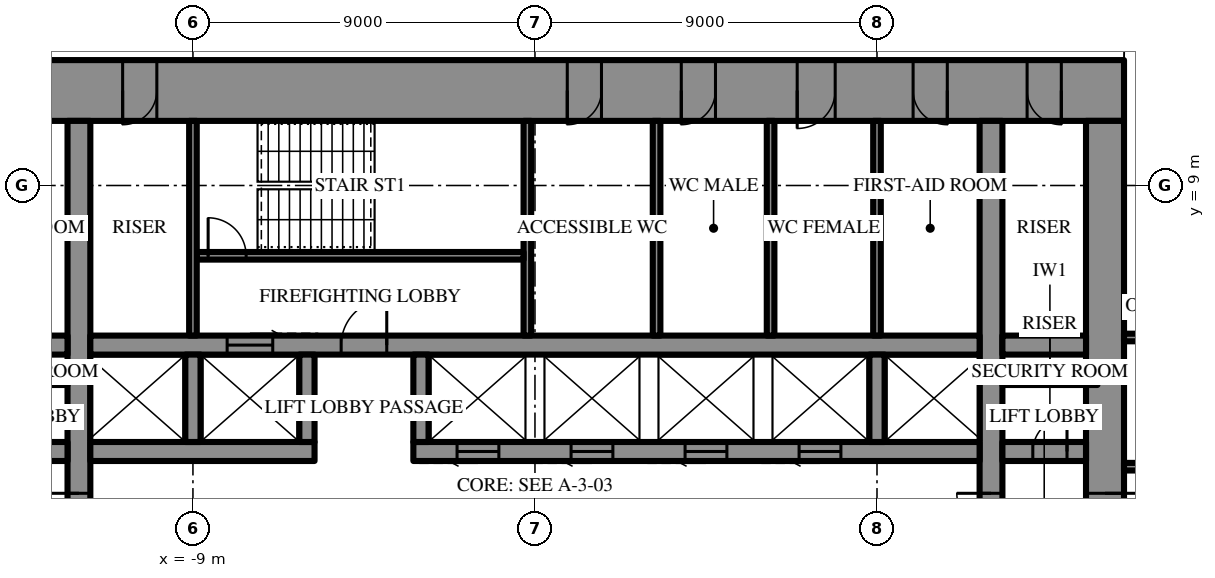
"""IFC4 building model, lengths in metres.
Left out: names, types, materials, properties, quantities, classifications, styles, units other than length and angle.
Written with IfcOpenShell. Run it as: python <this file> out.ifc"""

import sys

from ifc_helpers import new_model, si_unit, direction, frame, frame_2d, origin, place, context, subcontext, project, spatial, rectangle, extrude, element, fill, save


model = new_model("IFC4")
c1 = context("Model", 3, precision=1e-05, world=origin(), true_north=direction((0.0, 1.0)))
c2 = subcontext(c1, "Body", "Model", "MODEL_VIEW")
j1 = project(units=[si_unit("LENGTHUNIT", "METRE"), si_unit("PLANEANGLEUNIT", "RADIAN")], contexts=[c1])
p1 = place(None, origin())
s1 = spatial("IfcSite", under=j1, at=p1, CompositionType="ELEMENT")
p2 = place(p1, origin())
s2 = spatial("IfcBuilding", under=s1, at=p2, CompositionType="ELEMENT")
p3 = place(p2, frame((0.0, 0.0, 253.3)))
s3 = spatial("IfcBuildingStorey", under=s2, at=p3, CompositionType="ELEMENT", Elevation=253.3)
p4 = place(p3, frame((-15.5, 11.5, 0.0), z_axis=(0.0, 0.0, 1.0), x_axis=(1.0, 0.0, 0.0)))
e1 = element("IfcWall", 1, at=p4, inside=s3, PredefinedType="SHEAR", context=c2, shape_type="SweptSolid", body=[
    extrude(rectangle(XDim=31.0, YDim=1.6, at=frame_2d((15.5, 0.0))), origin(), (0.0, 0.0, 1.0), 4.2),
])
p5 = place(p4, frame((16.35, 0.0, 0.0)))
e2 = element("IfcOpeningElement", 2, at=p5, cuts=e1, PredefinedType="OPENING", context=c2, shape_type="SweptSolid", body=[
    extrude(rectangle(XDim=0.9, YDim=2.2, at=frame_2d((0.45, 1.1))), frame((0.0, 0.81, 0.0), z_axis=(0.0, -1.0, 0.0), x_axis=(1.0, 0.0, 0.0)), (0.0, 0.0, 1.0), 1.62),
])
p6 = place(p4, frame((19.35, 0.0, 0.0)))
e3 = element("IfcOpeningElement", 3, at=p6, cuts=e1, PredefinedType="OPENING", context=c2, shape_type="SweptSolid", body=[
    extrude(rectangle(XDim=0.9, YDim=2.2, at=frame_2d((0.45, 1.1))), frame((0.0, 0.81, 0.0), z_axis=(0.0, -1.0, 0.0), x_axis=(1.0, 0.0, 0.0)), (0.0, 0.0, 1.0), 1.62),
])
p7 = place(p4, frame((22.4, 0.0, 0.0)))
e4 = element("IfcOpeningElement", 4, at=p7, cuts=e1, PredefinedType="OPENING", context=c2, shape_type="SweptSolid", body=[
    extrude(rectangle(XDim=1.0, YDim=2.2, at=frame_2d((0.5, 1.1))), frame((0.0, 0.81, 0.0), z_axis=(0.0, -1.0, 0.0), x_axis=(1.0, 0.0, 0.0)), (0.0, 0.0, 1.0), 1.62),
])
p8 = place(p4, frame((1.65, 0.0, 0.0)))
e5 = element("IfcOpeningElement", 5, at=p8, cuts=e1, PredefinedType="OPENING", context=c2, shape_type="SweptSolid", body=[
    extrude(rectangle(XDim=0.9, YDim=2.2, at=frame_2d((0.45, 1.1))), frame((0.0, 0.81, 0.0), z_axis=(0.0, -1.0, 0.0), x_axis=(1.0, 0.0, 0.0)), (0.0, 0.0, 1.0), 1.62),
])
p9 = place(p4, frame((4.65, 0.0, 0.0)))
e6 = element("IfcOpeningElement", 6, at=p9, cuts=e1, PredefinedType="OPENING", context=c2, shape_type="SweptSolid", body=[
    extrude(rectangle(XDim=0.9, YDim=2.2, at=frame_2d((0.45, 1.1))), frame((0.0, 0.81, 0.0), z_axis=(0.0, -1.0, 0.0), x_axis=(1.0, 0.0, 0.0)), (0.0, 0.0, 1.0), 1.62),
])
p10 = place(p4, frame((25.45, 0.0, 0.0)))
e7 = element("IfcOpeningElement", 7, at=p10, cuts=e1, PredefinedType="OPENING", context=c2, shape_type="SweptSolid", body=[
    extrude(rectangle(XDim=0.9, YDim=2.2, at=frame_2d((0.45, 1.1))), frame((0.0, 0.81, 0.0), z_axis=(0.0, -1.0, 0.0), x_axis=(1.0, 0.0, 0.0)), (0.0, 0.0, 1.0), 1.62),
])
p11 = place(p4, frame((28.45, 0.0, 0.0)))
e8 = element("IfcOpeningElement", 8, at=p11, cuts=e1, PredefinedType="OPENING", context=c2, shape_type="SweptSolid", body=[
    extrude(rectangle(XDim=0.9, YDim=2.2, at=frame_2d((0.45, 1.1))), frame((0.0, 0.81, 0.0), z_axis=(0.0, -1.0, 0.0), x_axis=(1.0, 0.0, 0.0)), (0.0, 0.0, 1.0), 1.62),
])
p12 = place(p3, frame((15.0, -10.7, 0.0), z_axis=(0.0, 0.0, 1.0), x_axis=(0.0, 1.0, 0.0)))
e9 = element("IfcWall", 9, at=p12, inside=s3, PredefinedType="SHEAR", context=c2, shape_type="SweptSolid", body=[
    extrude(rectangle(XDim=21.4, YDim=1.0, at=frame_2d((10.7, 0.0))), origin(), (0.0, 0.0, 1.0), 4.2),
])
p13 = place(p12, frame((9.8, 0.0, 0.0)))
e10 = element("IfcOpeningElement", 10, at=p13, cuts=e9, PredefinedType="OPENING", context=c2, shape_type="SweptSolid", body=[
    extrude(rectangle(XDim=1.8, YDim=2.4, at=frame_2d((0.9, 1.2))), frame((0.0, 0.51, 0.0), z_axis=(0.0, -1.0, 0.0), x_axis=(1.0, 0.0, 0.0)), (0.0, 0.0, 1.0), 1.02),
])
p14 = place(p3, frame((12.0, -10.7, 0.0), z_axis=(0.0, 0.0, 1.0), x_axis=(0.0, 1.0, 0.0)))
e11 = element("IfcWall", 11, at=p14, inside=s3, PredefinedType="SHEAR", context=c2, shape_type="SweptSolid", body=[
    extrude(rectangle(XDim=21.4, YDim=0.6, at=frame_2d((10.7, 0.0))), origin(), (0.0, 0.0, 1.0), 4.2),
])
p15 = place(p14, frame((9.8, 0.0, 0.0)))
e12 = element("IfcOpeningElement", 12, at=p15, cuts=e11, PredefinedType="OPENING", context=c2, shape_type="SweptSolid", body=[
    extrude(rectangle(XDim=1.8, YDim=2.4, at=frame_2d((0.9, 1.2))), frame((0.0, 0.31, 0.0), z_axis=(0.0, -1.0, 0.0), x_axis=(1.0, 0.0, 0.0)), (0.0, 0.0, 1.0), 0.62),
])
p16 = place(p3, frame((-12.0, -10.7, 0.0), z_axis=(0.0, 0.0, 1.0), x_axis=(0.0, 1.0, 0.0)))
e13 = element("IfcWall", 13, at=p16, inside=s3, PredefinedType="SHEAR", context=c2, shape_type="SweptSolid", body=[
    extrude(rectangle(XDim=21.4, YDim=0.6, at=frame_2d((10.7, 0.0))), origin(), (0.0, 0.0, 1.0), 4.2),
])
p17 = place(p16, frame((9.8, 0.0, 0.0)))
e14 = element("IfcOpeningElement", 14, at=p17, cuts=e13, PredefinedType="OPENING", context=c2, shape_type="SweptSolid", body=[
    extrude(rectangle(XDim=1.8, YDim=2.4, at=frame_2d((0.9, 1.2))), frame((0.0, 0.31, 0.0), z_axis=(0.0, -1.0, 0.0), x_axis=(1.0, 0.0, 0.0)), (0.0, 0.0, 1.0), 0.62),
])
p18 = place(p3, frame((-14.5, 2.0, 0.0), z_axis=(0.0, 0.0, 1.0), x_axis=(1.0, 0.0, 0.0)))
e15 = element("IfcWall", 15, at=p18, inside=s3, PredefinedType="SHEAR", context=c2, shape_type="SweptSolid", body=[
    extrude(rectangle(XDim=2.2, YDim=0.5, at=frame_2d((1.1, 0.0))), origin(), (0.0, 0.0, 1.0), 4.2),
])
p19 = place(p18, frame((0.5, 0.0, 0.0)))
e16 = element("IfcOpeningElement", 16, at=p19, cuts=e15, PredefinedType="OPENING", context=c2, shape_type="SweptSolid", body=[
    extrude(rectangle(XDim=0.9, YDim=2.2, at=frame_2d((0.45, 1.1))), frame((0.0, 0.26, 0.0), z_axis=(0.0, -1.0, 0.0), x_axis=(1.0, 0.0, 0.0)), (0.0, 0.0, 1.0), 0.52),
])
p20 = place(p3, frame((-11.7, 2.0, 0.0), z_axis=(0.0, 0.0, 1.0), x_axis=(1.0, 0.0, 0.0)))
e17 = element("IfcWall", 17, at=p20, inside=s3, PredefinedType="SHEAR", context=c2, shape_type="SweptSolid", body=[
    extrude(rectangle(XDim=5.9, YDim=0.5, at=frame_2d((2.95, 0.0))), origin(), (0.0, 0.0, 1.0), 4.2),
])
p21 = place(p3, frame((-3.2, 2.0, 0.0), z_axis=(0.0, 0.0, 1.0), x_axis=(1.0, 0.0, 0.0)))
e18 = element("IfcWall", 18, at=p21, inside=s3, PredefinedType="SHEAR", context=c2, shape_type="SweptSolid", body=[
    extrude(rectangle(XDim=14.9, YDim=0.5, at=frame_2d((7.45, 0.0))), origin(), (0.0, 0.0, 1.0), 4.2),
])
p22 = place(p21, frame((1.15, 0.0, 0.0)))
e19 = element("IfcOpeningElement", 19, at=p22, cuts=e18, PredefinedType="OPENING", context=c2, shape_type="SweptSolid", body=[
    extrude(rectangle(XDim=1.1, YDim=2.2, at=frame_2d((0.55, 1.1))), frame((0.0, 0.26, 0.0), z_axis=(0.0, -1.0, 0.0), x_axis=(1.0, 0.0, 0.0)), (0.0, 0.0, 1.0), 0.52),
])
p23 = place(p21, frame((4.15, 0.0, 0.0)))
e20 = element("IfcOpeningElement", 20, at=p23, cuts=e18, PredefinedType="OPENING", context=c2, shape_type="SweptSolid", body=[
    extrude(rectangle(XDim=1.1, YDim=2.2, at=frame_2d((0.55, 1.1))), frame((0.0, 0.26, 0.0), z_axis=(0.0, -1.0, 0.0), x_axis=(1.0, 0.0, 0.0)), (0.0, 0.0, 1.0), 0.52),
])
p24 = place(p21, frame((7.15, 0.0, 0.0)))
e21 = element("IfcOpeningElement", 21, at=p24, cuts=e18, PredefinedType="OPENING", context=c2, shape_type="SweptSolid", body=[
    extrude(rectangle(XDim=1.1, YDim=2.2, at=frame_2d((0.55, 1.1))), frame((0.0, 0.26, 0.0), z_axis=(0.0, -1.0, 0.0), x_axis=(1.0, 0.0, 0.0)), (0.0, 0.0, 1.0), 0.52),
])
p25 = place(p21, frame((10.15, 0.0, 0.0)))
e22 = element("IfcOpeningElement", 22, at=p25, cuts=e18, PredefinedType="OPENING", context=c2, shape_type="SweptSolid", body=[
    extrude(rectangle(XDim=1.1, YDim=2.2, at=frame_2d((0.55, 1.1))), frame((0.0, 0.26, 0.0), z_axis=(0.0, -1.0, 0.0), x_axis=(1.0, 0.0, 0.0)), (0.0, 0.0, 1.0), 0.52),
])
p26 = place(p3, frame((12.3, 2.0, 0.0), z_axis=(0.0, 0.0, 1.0), x_axis=(1.0, 0.0, 0.0)))
e23 = element("IfcWall", 23, at=p26, inside=s3, PredefinedType="SHEAR", context=c2, shape_type="SweptSolid", body=[
    extrude(rectangle(XDim=2.2, YDim=0.5, at=frame_2d((1.1, 0.0))), origin(), (0.0, 0.0, 1.0), 4.2),
])
p27 = place(p26, frame((0.8, 0.0, 0.0)))
e24 = element("IfcOpeningElement", 24, at=p27, cuts=e23, PredefinedType="OPENING", context=c2, shape_type="SweptSolid", body=[
    extrude(rectangle(XDim=0.9, YDim=2.2, at=frame_2d((0.45, 1.1))), frame((0.0, 0.26, 0.0), z_axis=(0.0, -1.0, 0.0), x_axis=(1.0, 0.0, 0.0)), (0.0, 0.0, 1.0), 0.52),
])
p28 = place(p3, frame((-14.5, 4.8, 0.0), z_axis=(0.0, 0.0, 1.0), x_axis=(1.0, 0.0, 0.0)))
e25 = element("IfcWall", 25, at=p28, inside=s3, PredefinedType="SHEAR", context=c2, shape_type="SweptSolid", body=[
    extrude(rectangle(XDim=2.2, YDim=0.5, at=frame_2d((1.1, 0.0))), origin(), (0.0, 0.0, 1.0), 4.2),
])
p29 = place(p3, frame((-11.7, 4.8, 0.0), z_axis=(0.0, 0.0, 1.0), x_axis=(1.0, 0.0, 0.0)))
e26 = element("IfcWall", 26, at=p29, inside=s3, PredefinedType="SHEAR", context=c2, shape_type="SweptSolid", body=[
    extrude(rectangle(XDim=23.4, YDim=0.5, at=frame_2d((11.7, 0.0))), origin(), (0.0, 0.0, 1.0), 4.2),
])
p30 = place(p29, frame((6.6, 0.0, 0.0)))
e27 = element("IfcOpeningElement", 27, at=p30, cuts=e26, PredefinedType="OPENING", context=c2, shape_type="SweptSolid", body=[
    extrude(rectangle(XDim=1.2, YDim=2.2, at=frame_2d((0.6, 1.1))), frame((0.0, 0.26, 0.0), z_axis=(0.0, -1.0, 0.0), x_axis=(1.0, 0.0, 0.0)), (0.0, 0.0, 1.0), 0.52),
])
p31 = place(p29, frame((3.6, 0.0, 0.0)))
e28 = element("IfcOpeningElement", 28, at=p31, cuts=e26, PredefinedType="OPENING", context=c2, shape_type="SweptSolid", body=[
    extrude(rectangle(XDim=1.2, YDim=2.2, at=frame_2d((0.6, 1.1))), frame((0.0, 0.26, 0.0), z_axis=(0.0, -1.0, 0.0), x_axis=(1.0, 0.0, 0.0)), (0.0, 0.0, 1.0), 0.52),
])
p32 = place(p3, frame((12.3, 4.8, 0.0), z_axis=(0.0, 0.0, 1.0), x_axis=(1.0, 0.0, 0.0)))
e29 = element("IfcWall", 29, at=p32, inside=s3, PredefinedType="SHEAR", context=c2, shape_type="SweptSolid", body=[
    extrude(rectangle(XDim=2.2, YDim=0.5, at=frame_2d((1.1, 0.0))), origin(), (0.0, 0.0, 1.0), 4.2),
])
for number, where, z_axis, x_axis in (
    (30, (-9.0, 2.25, 0.0), (0.0, 0.0, 1.0), (0.0, 1.0, 0.0)),
    (31, (-6.0, 2.25, 0.0), (0.0, 0.0, 1.0), (0.0, 1.0, 0.0)),
    (32, (-3.0, 2.25, 0.0), (0.0, 0.0, 1.0), (0.0, 1.0, 0.0)),
    (33, (9.0, 2.25, 0.0), (0.0, 0.0, 1.0), (0.0, 1.0, 0.0)),
):
    element("IfcWall", number, at=place(p3, frame(where, z_axis=z_axis, x_axis=x_axis)), inside=s3, PredefinedType="SHEAR", context=c2, shape_type="SweptSolid", body=[
        extrude(rectangle(XDim=2.3, YDim=0.4, at=frame_2d((1.15, 0.0))), origin(), (0.0, 0.0, 1.0), 4.2),
    ])
p33 = place(p3, frame((-0.2, 5.05, 0.0), z_axis=(0.0, 0.0, 1.0), x_axis=(0.0, 1.0, 0.0)))
e34 = element("IfcWall", 34, at=p33, inside=s3, PredefinedType="SHEAR", context=c2, shape_type="SweptSolid", body=[
    extrude(rectangle(XDim=5.65, YDim=0.2, at=frame_2d((2.825, 0.0))), origin(), (0.0, 0.0, 1.0), 4.2),
])
p34 = place(p3, frame((-8.9, 7.15, 0.0), z_axis=(0.0, 0.0, 1.0), x_axis=(1.0, 0.0, 0.0)))
e35 = element("IfcWall", 35, at=p34, inside=s3, PredefinedType="SHEAR", context=c2, shape_type="SweptSolid", body=[
    extrude(rectangle(XDim=8.6, YDim=0.2, at=frame_2d((4.3, 0.0))), origin(), (0.0, 0.0, 1.0), 4.2),
])
p35 = place(p34, frame((0.3, 0.0, 0.0)))
e36 = element("IfcOpeningElement", 36, at=p35, cuts=e35, PredefinedType="OPENING", context=c2, shape_type="SweptSolid", body=[
    extrude(rectangle(XDim=1.0, YDim=2.2, at=frame_2d((0.5, 1.1))), frame((0.0, 0.11, 0.0), z_axis=(0.0, -1.0, 0.0), x_axis=(1.0, 0.0, 0.0)), (0.0, 0.0, 1.0), 0.22),
])
for number, where, z_axis, x_axis in (
    (37, (-9.0, 5.05, 0.0), (0.0, 0.0, 1.0), (0.0, 1.0, 0.0)),
    (38, (9.0, 5.05, 0.0), (0.0, 0.0, 1.0), (0.0, 1.0, 0.0)),
    (39, (3.2, 5.05, 0.0), (0.0, 0.0, 1.0), (0.0, 1.0, 0.0)),
    (40, (6.2, 5.05, 0.0), (0.0, 0.0, 1.0), (0.0, 1.0, 0.0)),
):
    element("IfcWall", number, at=place(p3, frame(where, z_axis=z_axis, x_axis=x_axis)), inside=s3, PredefinedType="PARTITIONING", context=c2, shape_type="SweptSolid", body=[
        extrude(rectangle(XDim=5.65, YDim=0.2, at=frame_2d((2.825, 0.0))), origin(), (0.0, 0.0, 1.0), 4.0),
    ])
for number, where, z_axis, x_axis in (
    (41, (-14.8, 3.85, 0.0), (0.0, 0.0, 1.0), (1.0, 0.0, 0.0)),
    (42, (12.3, 3.85, 0.0), (0.0, 0.0, 1.0), (1.0, 0.0, 0.0)),
):
    element("IfcWall", number, at=place(p3, frame(where, z_axis=z_axis, x_axis=x_axis)), inside=s3, PredefinedType="PARTITIONING", context=c2, shape_type="SweptSolid", body=[
        extrude(rectangle(XDim=2.5, YDim=0.2, at=frame_2d((1.25, 0.0))), origin(), (0.0, 0.0, 1.0), 4.0),
    ])
p36 = place(p3, frame((15.5, 1.6, 0.0), z_axis=(0.0, 0.0, 1.0), x_axis=(1.0, 0.0, 0.0)))
e43 = element("IfcWall", 43, at=p36, inside=s3, PredefinedType="PARTITIONING", context=c2, shape_type="SweptSolid", body=[
    extrude(rectangle(XDim=2.3, YDim=0.2, at=frame_2d((1.15, 0.0))), origin(), (0.0, 0.0, 1.0), 4.0),
])
p37 = place(p3, frame((15.5, 5.0, 0.0), z_axis=(0.0, 0.0, 1.0), x_axis=(1.0, 0.0, 0.0)))
e44 = element("IfcWall", 44, at=p37, inside=s3, PredefinedType="PARTITIONING", context=c2, shape_type="SweptSolid", body=[
    extrude(rectangle(XDim=2.3, YDim=0.2, at=frame_2d((1.15, 0.0))), origin(), (0.0, 0.0, 1.0), 4.0),
])
p38 = place(p37, frame((0.65, 0.0, 0.0)))
e45 = element("IfcOpeningElement", 45, at=p38, cuts=e44, PredefinedType="OPENING", context=c2, shape_type="SweptSolid", body=[
    extrude(rectangle(XDim=1.0, YDim=2.2, at=frame_2d((0.5, 1.1))), frame((0.0, 0.11, 0.0), z_axis=(0.0, -1.0, 0.0), x_axis=(1.0, 0.0, 0.0)), (0.0, 0.0, 1.0), 0.22),
])
p39 = place(p13, frame((1.8, 0.0, 0.0), z_axis=(0.0, 0.0, 1.0), x_axis=(-1.0, 0.0, 0.0)))
e46 = element("IfcDoor", 46, at=p39, inside=s3, OperationType="DOUBLE_DOOR_SINGLE_SWING", PredefinedType="DOOR", context=c2, shape_type="SweptSolid", body=[
    extrude(rectangle(XDim=1.8, YDim=2.4, at=frame_2d((0.9, 1.2))), frame((0.0, 0.025, 0.0), z_axis=(0.0, -1.0, 0.0), x_axis=(1.0, 0.0, 0.0)), (0.0, 0.0, 1.0), 0.05),
])
fill(e10, e46)
p40 = place(p30, origin())
e47 = element("IfcDoor", 47, at=p40, inside=s3, OperationType="SINGLE_SWING_LEFT", PredefinedType="DOOR", context=c2, shape_type="SweptSolid", body=[
    extrude(rectangle(XDim=1.2, YDim=2.2, at=frame_2d((0.6, 1.1))), frame((0.0, 0.025, 0.0), z_axis=(0.0, -1.0, 0.0), x_axis=(1.0, 0.0, 0.0)), (0.0, 0.0, 1.0), 0.05),
])
fill(e27, e47)
p41 = place(p35, origin())
e48 = element("IfcDoor", 48, at=p41, inside=s3, OperationType="SINGLE_SWING_RIGHT", PredefinedType="DOOR", context=c2, shape_type="SweptSolid", body=[
    extrude(rectangle(XDim=1.0, YDim=2.2, at=frame_2d((0.5, 1.1))), frame((0.0, 0.025, 0.0), z_axis=(0.0, -1.0, 0.0), x_axis=(1.0, 0.0, 0.0)), (0.0, 0.0, 1.0), 0.05),
])
fill(e36, e48)
p42 = place(p5, frame((0.9, 0.0, 0.0), z_axis=(0.0, 0.0, 1.0), x_axis=(-1.0, 0.0, 0.0)))
e49 = element("IfcDoor", 49, at=p42, inside=s3, OperationType="SINGLE_SWING_LEFT", PredefinedType="DOOR", context=c2, shape_type="SweptSolid", body=[
    extrude(rectangle(XDim=0.9, YDim=2.2, at=frame_2d((0.45, 1.1))), frame((0.0, 0.025, 0.0), z_axis=(0.0, -1.0, 0.0), x_axis=(1.0, 0.0, 0.0)), (0.0, 0.0, 1.0), 0.05),
])
fill(e2, e49)
p43 = place(p6, frame((0.9, 0.0, 0.0), z_axis=(0.0, 0.0, 1.0), x_axis=(-1.0, 0.0, 0.0)))
e50 = element("IfcDoor", 50, at=p43, inside=s3, OperationType="SINGLE_SWING_LEFT", PredefinedType="DOOR", context=c2, shape_type="SweptSolid", body=[
    extrude(rectangle(XDim=0.9, YDim=2.2, at=frame_2d((0.45, 1.1))), frame((0.0, 0.025, 0.0), z_axis=(0.0, -1.0, 0.0), x_axis=(1.0, 0.0, 0.0)), (0.0, 0.0, 1.0), 0.05),
])
fill(e3, e50)
p44 = place(p7, frame((1.0, 0.0, 0.0), z_axis=(0.0, 0.0, 1.0), x_axis=(-1.0, 0.0, 0.0)))
e51 = element("IfcDoor", 51, at=p44, inside=s3, OperationType="SINGLE_SWING_LEFT", PredefinedType="DOOR", context=c2, shape_type="SweptSolid", body=[
    extrude(rectangle(XDim=1.0, YDim=2.2, at=frame_2d((0.5, 1.1))), frame((0.0, 0.025, 0.0), z_axis=(0.0, -1.0, 0.0), x_axis=(1.0, 0.0, 0.0)), (0.0, 0.0, 1.0), 0.05),
])
fill(e4, e51)
p45 = place(p9, frame((0.9, 0.0, 0.0), z_axis=(0.0, 0.0, 1.0), x_axis=(-1.0, 0.0, 0.0)))
e52 = element("IfcDoor", 52, at=p45, inside=s3, OperationType="SINGLE_SWING_LEFT", PredefinedType="DOOR", context=c2, shape_type="SweptSolid", body=[
    extrude(rectangle(XDim=0.9, YDim=2.2, at=frame_2d((0.45, 1.1))), frame((0.0, 0.025, 0.0), z_axis=(0.0, -1.0, 0.0), x_axis=(1.0, 0.0, 0.0)), (0.0, 0.0, 1.0), 0.05),
])
fill(e6, e52)
p46 = place(p10, frame((0.9, 0.0, 0.0), z_axis=(0.0, 0.0, 1.0), x_axis=(-1.0, 0.0, 0.0)))
e53 = element("IfcDoor", 53, at=p46, inside=s3, OperationType="SINGLE_SWING_RIGHT", PredefinedType="DOOR", context=c2, shape_type="SweptSolid", body=[
    extrude(rectangle(XDim=0.9, YDim=2.2, at=frame_2d((0.45, 1.1))), frame((0.0, 0.025, 0.0), z_axis=(0.0, -1.0, 0.0), x_axis=(1.0, 0.0, 0.0)), (0.0, 0.0, 1.0), 0.05),
])
fill(e7, e53)
p47 = place(p11, frame((0.9, 0.0, 0.0), z_axis=(0.0, 0.0, 1.0), x_axis=(-1.0, 0.0, 0.0)))
e54 = element("IfcDoor", 54, at=p47, inside=s3, OperationType="SINGLE_SWING_RIGHT", PredefinedType="DOOR", context=c2, shape_type="SweptSolid", body=[
    extrude(rectangle(XDim=0.9, YDim=2.2, at=frame_2d((0.45, 1.1))), frame((0.0, 0.025, 0.0), z_axis=(0.0, -1.0, 0.0), x_axis=(1.0, 0.0, 0.0)), (0.0, 0.0, 1.0), 0.05),
])
fill(e8, e54)
p48 = place(p27, origin())
e55 = element("IfcDoor", 55, at=p48, inside=s3, OperationType="SINGLE_SWING_LEFT", PredefinedType="DOOR", context=c2, shape_type="SweptSolid", body=[
    extrude(rectangle(XDim=0.9, YDim=2.2, at=frame_2d((0.45, 1.1))), frame((0.0, 0.025, 0.0), z_axis=(0.0, -1.0, 0.0), x_axis=(1.0, 0.0, 0.0)), (0.0, 0.0, 1.0), 0.05),
])
fill(e24, e55)
p49 = place(p15, origin())
e56 = element("IfcDoor", 56, at=p49, inside=s3, OperationType="DOUBLE_DOOR_SINGLE_SWING", PredefinedType="DOOR", context=c2, shape_type="SweptSolid", body=[
    extrude(rectangle(XDim=1.8, YDim=2.4, at=frame_2d((0.9, 1.2))), frame((0.0, 0.025, 0.0), z_axis=(0.0, -1.0, 0.0), x_axis=(1.0, 0.0, 0.0)), (0.0, 0.0, 1.0), 0.05),
])
fill(e12, e56)
p50 = place(p17, origin())
e57 = element("IfcDoor", 57, at=p50, inside=s3, OperationType="DOUBLE_DOOR_SINGLE_SWING", PredefinedType="DOOR", context=c2, shape_type="SweptSolid", body=[
    extrude(rectangle(XDim=1.8, YDim=2.4, at=frame_2d((0.9, 1.2))), frame((0.0, 0.025, 0.0), z_axis=(0.0, -1.0, 0.0), x_axis=(1.0, 0.0, 0.0)), (0.0, 0.0, 1.0), 0.05),
])
fill(e14, e57)
p51 = place(p31, origin())
e58 = element("IfcDoor", 58, at=p51, inside=s3, OperationType="SLIDING_TO_LEFT", PredefinedType="DOOR", context=c2, shape_type="SweptSolid", body=[
    extrude(rectangle(XDim=1.2, YDim=2.2, at=frame_2d((0.6, 1.1))), frame((0.0, 0.025, 0.0), z_axis=(0.0, -1.0, 0.0), x_axis=(1.0, 0.0, 0.0)), (0.0, 0.0, 1.0), 0.05),
])
fill(e28, e58)
p52 = place(p22, frame((1.1, 0.0, 0.0), z_axis=(0.0, 0.0, 1.0), x_axis=(-1.0, 0.0, 0.0)))
e59 = element("IfcDoor", 59, at=p52, inside=s3, OperationType="SLIDING_TO_LEFT", PredefinedType="DOOR", context=c2, shape_type="SweptSolid", body=[
    extrude(rectangle(XDim=1.1, YDim=2.2, at=frame_2d((0.55, 1.1))), frame((0.0, 0.025, 0.0), z_axis=(0.0, -1.0, 0.0), x_axis=(1.0, 0.0, 0.0)), (0.0, 0.0, 1.0), 0.05),
])
fill(e19, e59)
p53 = place(p23, frame((1.1, 0.0, 0.0), z_axis=(0.0, 0.0, 1.0), x_axis=(-1.0, 0.0, 0.0)))
e60 = element("IfcDoor", 60, at=p53, inside=s3, OperationType="SLIDING_TO_LEFT", PredefinedType="DOOR", context=c2, shape_type="SweptSolid", body=[
    extrude(rectangle(XDim=1.1, YDim=2.2, at=frame_2d((0.55, 1.1))), frame((0.0, 0.025, 0.0), z_axis=(0.0, -1.0, 0.0), x_axis=(1.0, 0.0, 0.0)), (0.0, 0.0, 1.0), 0.05),
])
fill(e20, e60)
p54 = place(p24, frame((1.1, 0.0, 0.0), z_axis=(0.0, 0.0, 1.0), x_axis=(-1.0, 0.0, 0.0)))
e61 = element("IfcDoor", 61, at=p54, inside=s3, OperationType="SLIDING_TO_LEFT", PredefinedType="DOOR", context=c2, shape_type="SweptSolid", body=[
    extrude(rectangle(XDim=1.1, YDim=2.2, at=frame_2d((0.55, 1.1))), frame((0.0, 0.025, 0.0), z_axis=(0.0, -1.0, 0.0), x_axis=(1.0, 0.0, 0.0)), (0.0, 0.0, 1.0), 0.05),
])
fill(e21, e61)
p55 = place(p25, frame((1.1, 0.0, 0.0), z_axis=(0.0, 0.0, 1.0), x_axis=(-1.0, 0.0, 0.0)))
e62 = element("IfcDoor", 62, at=p55, inside=s3, OperationType="SLIDING_TO_LEFT", PredefinedType="DOOR", context=c2, shape_type="SweptSolid", body=[
    extrude(rectangle(XDim=1.1, YDim=2.2, at=frame_2d((0.55, 1.1))), frame((0.0, 0.025, 0.0), z_axis=(0.0, -1.0, 0.0), x_axis=(1.0, 0.0, 0.0)), (0.0, 0.0, 1.0), 0.05),
])
fill(e22, e62)
save(model, sys.argv[1])
